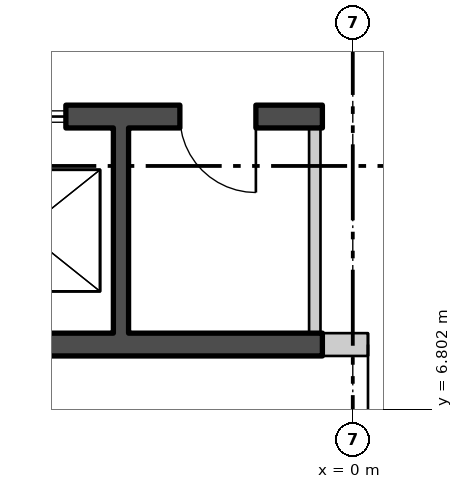
"""IFC4 building model, lengths in metres.
Left out: names, types, materials, properties, quantities, classifications, styles, units other than length and angle.
Written with IfcOpenShell. Run it as: python <this file> out.ifc"""

import sys

from ifc_helpers import new_model, si_unit, direction, frame, frame_2d, origin, place, context, subcontext, project, spatial, polyline, rectangle, outline, extrude, element, fill, save


model = new_model("IFC4")
c1 = context("Model", 3, precision=1e-05, world=origin(), true_north=direction((0.0, 1.0)))
c2 = subcontext(c1, "Body", "Model", "MODEL_VIEW")
j1 = project(units=[si_unit("LENGTHUNIT", "METRE"), si_unit("PLANEANGLEUNIT", "RADIAN")], contexts=[c1])
p1 = place(None, origin())
s1 = spatial("IfcSite", under=j1, at=p1, CompositionType="ELEMENT")
p2 = place(p1, origin())
s2 = spatial("IfcBuilding", under=s1, at=p2, CompositionType="ELEMENT")
p3 = place(p2, frame((0.0, 0.0, 239.4)))
s3 = spatial("IfcBuildingStorey", under=s2, at=p3, CompositionType="ELEMENT", Elevation=239.4)
p4 = place(p3, frame((-25.975, 14.597, -0.18), z_axis=(0.0, 0.0, 1.0), x_axis=(0.499999764979, -0.866025539474, 0.0)))
e1 = element("IfcWall", 1, at=p4, inside=s3, PredefinedType="SOLIDWALL", context=c2, shape_type="SweptSolid", body=[
    extrude(outline(polyline([(-0.13, -0.225), (45.87, -0.225), (45.61, 0.225), (0.13, 0.225), (-0.13, -0.225)])), origin(), (0.0, 0.0, 1.0), 6.0),
])
p5 = place(p4, frame((1.424, 0.0, 1.38)))
e2 = element("IfcOpeningElement", 2, at=p5, cuts=e1, PredefinedType="OPENING", context=c2, shape_type="SweptSolid", body=[
    extrude(rectangle(XDim=2.4, YDim=3.6, at=frame_2d((1.2, 1.8))), frame((0.0, 0.235, 0.0), z_axis=(0.0, -1.0, 0.0), x_axis=(1.0, 0.0, 0.0)), (0.0, 0.0, 1.0), 0.47),
])
p6 = place(p4, frame((5.893, 0.0, 1.38)))
e3 = element("IfcOpeningElement", 3, at=p6, cuts=e1, PredefinedType="OPENING", context=c2, shape_type="SweptSolid", body=[
    extrude(rectangle(XDim=2.4, YDim=3.6, at=frame_2d((1.2, 1.8))), frame((0.0, 0.235, 0.0), z_axis=(0.0, -1.0, 0.0), x_axis=(1.0, 0.0, 0.0)), (0.0, 0.0, 1.0), 0.47),
])
p7 = place(p4, frame((10.401, 0.0, 1.38)))
e4 = element("IfcOpeningElement", 4, at=p7, cuts=e1, PredefinedType="OPENING", context=c2, shape_type="SweptSolid", body=[
    extrude(rectangle(XDim=2.4, YDim=3.6, at=frame_2d((1.2, 1.8))), frame((0.0, 0.235, 0.0), z_axis=(0.0, -1.0, 0.0), x_axis=(1.0, 0.0, 0.0)), (0.0, 0.0, 1.0), 0.47),
])
p8 = place(p4, frame((14.909, 0.0, 1.38)))
e5 = element("IfcOpeningElement", 5, at=p8, cuts=e1, PredefinedType="OPENING", context=c2, shape_type="SweptSolid", body=[
    extrude(rectangle(XDim=2.4, YDim=3.6, at=frame_2d((1.2, 1.8))), frame((0.0, 0.235, 0.0), z_axis=(0.0, -1.0, 0.0), x_axis=(1.0, 0.0, 0.0)), (0.0, 0.0, 1.0), 0.47),
])
p9 = place(p4, frame((19.416, 0.0, 1.38)))
e6 = element("IfcOpeningElement", 6, at=p9, cuts=e1, PredefinedType="OPENING", context=c2, shape_type="SweptSolid", body=[
    extrude(rectangle(XDim=2.4, YDim=3.6, at=frame_2d((1.2, 1.8))), frame((0.0, 0.235, 0.0), z_axis=(0.0, -1.0, 0.0), x_axis=(1.0, 0.0, 0.0)), (0.0, 0.0, 1.0), 0.47),
])
p10 = place(p4, frame((23.924, 0.0, 1.38)))
e7 = element("IfcOpeningElement", 7, at=p10, cuts=e1, PredefinedType="OPENING", context=c2, shape_type="SweptSolid", body=[
    extrude(rectangle(XDim=2.4, YDim=3.6, at=frame_2d((1.2, 1.8))), frame((0.0, 0.235, 0.0), z_axis=(0.0, -1.0, 0.0), x_axis=(1.0, 0.0, 0.0)), (0.0, 0.0, 1.0), 0.47),
])
p11 = place(p4, frame((28.431, 0.0, 1.38)))
e8 = element("IfcOpeningElement", 8, at=p11, cuts=e1, PredefinedType="OPENING", context=c2, shape_type="SweptSolid", body=[
    extrude(rectangle(XDim=2.4, YDim=3.6, at=frame_2d((1.2, 1.8))), frame((0.0, 0.235, 0.0), z_axis=(0.0, -1.0, 0.0), x_axis=(1.0, 0.0, 0.0)), (0.0, 0.0, 1.0), 0.47),
])
p12 = place(p4, frame((32.939, 0.0, 1.38)))
e9 = element("IfcOpeningElement", 9, at=p12, cuts=e1, PredefinedType="OPENING", context=c2, shape_type="SweptSolid", body=[
    extrude(rectangle(XDim=2.4, YDim=3.6, at=frame_2d((1.2, 1.8))), frame((0.0, 0.235, 0.0), z_axis=(0.0, -1.0, 0.0), x_axis=(1.0, 0.0, 0.0)), (0.0, 0.0, 1.0), 0.47),
])
p13 = place(p4, frame((37.447, 0.0, 1.38)))
e10 = element("IfcOpeningElement", 10, at=p13, cuts=e1, PredefinedType="OPENING", context=c2, shape_type="SweptSolid", body=[
    extrude(rectangle(XDim=2.4, YDim=3.6, at=frame_2d((1.2, 1.8))), frame((0.0, 0.235, 0.0), z_axis=(0.0, -1.0, 0.0), x_axis=(1.0, 0.0, 0.0)), (0.0, 0.0, 1.0), 0.47),
])
p14 = place(p4, frame((41.916, 0.0, 1.38)))
e11 = element("IfcOpeningElement", 11, at=p14, cuts=e1, PredefinedType="OPENING", context=c2, shape_type="SweptSolid", body=[
    extrude(rectangle(XDim=2.4, YDim=3.6, at=frame_2d((1.2, 1.8))), frame((0.0, 0.235, 0.0), z_axis=(0.0, -1.0, 0.0), x_axis=(1.0, 0.0, 0.0)), (0.0, 0.0, 1.0), 0.47),
])
p15 = place(p3, frame((-10.7, 10.65, 0.0), z_axis=(0.0, 0.0, 1.0), x_axis=(1.0, 0.0, 0.0)))
e12 = element("IfcWall", 12, at=p15, inside=s3, PredefinedType="SHEAR", context=c2, shape_type="SweptSolid", body=[
    extrude(rectangle(XDim=10.3, YDim=0.3, at=frame_2d((5.15, 0.0))), origin(), (0.0, 0.0, 1.0), 5.8),
])
p16 = place(p15, frame((0.675, 0.0, 0.0)))
e13 = element("IfcOpeningElement", 13, at=p16, cuts=e12, PredefinedType="OPENING", context=c2, shape_type="SweptSolid", body=[
    extrude(rectangle(XDim=1.1, YDim=2.1, at=frame_2d((0.55, 1.05))), frame((0.0, 0.16, 0.0), z_axis=(0.0, -1.0, 0.0), x_axis=(1.0, 0.0, 0.0)), (0.0, 0.0, 1.0), 0.32),
])
p17 = place(p15, frame((3.275, 0.0, 0.0)))
e14 = element("IfcOpeningElement", 14, at=p17, cuts=e12, PredefinedType="OPENING", context=c2, shape_type="SweptSolid", body=[
    extrude(rectangle(XDim=1.1, YDim=2.1, at=frame_2d((0.55, 1.05))), frame((0.0, 0.16, 0.0), z_axis=(0.0, -1.0, 0.0), x_axis=(1.0, 0.0, 0.0)), (0.0, 0.0, 1.0), 0.32),
])
p18 = place(p15, frame((5.825, 0.0, 0.0)))
e15 = element("IfcOpeningElement", 15, at=p18, cuts=e12, PredefinedType="OPENING", context=c2, shape_type="SweptSolid", body=[
    extrude(rectangle(XDim=1.1, YDim=2.1, at=frame_2d((0.55, 1.05))), frame((0.0, 0.16, 0.0), z_axis=(0.0, -1.0, 0.0), x_axis=(1.0, 0.0, 0.0)), (0.0, 0.0, 1.0), 0.32),
])
p19 = place(p15, frame((8.425, 0.0, 0.0)))
e16 = element("IfcOpeningElement", 16, at=p19, cuts=e12, PredefinedType="OPENING", context=c2, shape_type="SweptSolid", body=[
    extrude(rectangle(XDim=1.0, YDim=2.1, at=frame_2d((0.5, 1.05))), frame((0.0, 0.16, 0.0), z_axis=(0.0, -1.0, 0.0), x_axis=(1.0, 0.0, 0.0)), (0.0, 0.0, 1.0), 0.32),
])
p20 = place(p3, frame((-10.7, 7.65, 0.0), z_axis=(0.0, 0.0, 1.0), x_axis=(1.0, 0.0, 0.0)))
e17 = element("IfcWall", 17, at=p20, inside=s3, PredefinedType="SHEAR", context=c2, shape_type="SweptSolid", body=[
    extrude(rectangle(XDim=10.3, YDim=0.3, at=frame_2d((5.15, 0.0))), origin(), (0.0, 0.0, 1.0), 5.8),
])
p21 = place(p3, frame((-3.05, 7.8, 0.0), z_axis=(0.0, 0.0, 1.0), x_axis=(0.0, 1.0, 0.0)))
e18 = element("IfcWall", 18, at=p21, inside=s3, PredefinedType="SHEAR", context=c2, shape_type="SweptSolid", body=[
    extrude(rectangle(XDim=2.7, YDim=0.2, at=frame_2d((1.35, 0.0))), origin(), (0.0, 0.0, 1.0), 5.8),
])
p22 = place(p3, frame((-0.5, 7.8, 0.0), z_axis=(0.0, 0.0, 1.0), x_axis=(0.0, 1.0, 0.0)))
e19 = element("IfcWall", 19, at=p22, inside=s3, PredefinedType="PARTITIONING", context=c2, shape_type="SweptSolid", body=[
    extrude(rectangle(XDim=2.7, YDim=0.15, at=frame_2d((1.35, 0.0))), origin(), (0.0, 0.0, 1.0), 5.8),
])
p23 = place(p3, frame((-0.4, 7.65, 0.0), z_axis=(0.0, 0.0, 1.0), x_axis=(1.0, 0.0, 0.0)))
e20 = element("IfcWall", 20, at=p23, inside=s3, PredefinedType="PARTITIONING", context=c2, shape_type="SweptSolid", body=[
    extrude(rectangle(XDim=3.0, YDim=0.3, at=frame_2d((1.5, 0.0))), origin(), (0.0, 0.0, 1.0), 5.8),
])
p24 = place(p23, frame((0.6, 0.0, 0.0)))
e21 = element("IfcOpeningElement", 21, at=p24, cuts=e20, PredefinedType="OPENING", context=c2, shape_type="SweptSolid", body=[
    extrude(rectangle(XDim=1.8, YDim=2.4, at=frame_2d((0.9, 1.2))), frame((0.0, 0.16, 0.0), z_axis=(0.0, -1.0, 0.0), x_axis=(1.0, 0.0, 0.0)), (0.0, 0.0, 1.0), 0.32),
])
p25 = place(p18, origin())
e22 = element("IfcDoor", 22, at=p25, inside=s3, OperationType="SLIDING_TO_LEFT", PredefinedType="DOOR", context=c2, shape_type="SweptSolid", body=[
    extrude(rectangle(XDim=1.1, YDim=2.1, at=frame_2d((0.55, 1.05))), frame((0.0, 0.025, 0.0), z_axis=(0.0, -1.0, 0.0), x_axis=(1.0, 0.0, 0.0)), (0.0, 0.0, 1.0), 0.05),
])
fill(e15, e22)
p26 = place(p19, origin())
e23 = element("IfcDoor", 23, at=p26, inside=s3, OperationType="SINGLE_SWING_RIGHT", PredefinedType="DOOR", context=c2, shape_type="SweptSolid", body=[
    extrude(rectangle(XDim=1.0, YDim=2.1, at=frame_2d((0.5, 1.05))), frame((0.0, 0.025, 0.0), z_axis=(0.0, -1.0, 0.0), x_axis=(1.0, 0.0, 0.0)), (0.0, 0.0, 1.0), 0.05),
])
fill(e16, e23)
p27 = place(p24, origin())
e24 = element("IfcDoor", 24, at=p27, inside=s3, OperationType="DOUBLE_DOOR_SINGLE_SWING", PredefinedType="DOOR", context=c2, shape_type="SweptSolid", body=[
    extrude(rectangle(XDim=1.8, YDim=2.4, at=frame_2d((0.9, 1.2))), frame((0.0, 0.025, 0.0), z_axis=(0.0, -1.0, 0.0), x_axis=(1.0, 0.0, 0.0)), (0.0, 0.0, 1.0), 0.05),
])
fill(e21, e24)
save(model, sys.argv[1])
